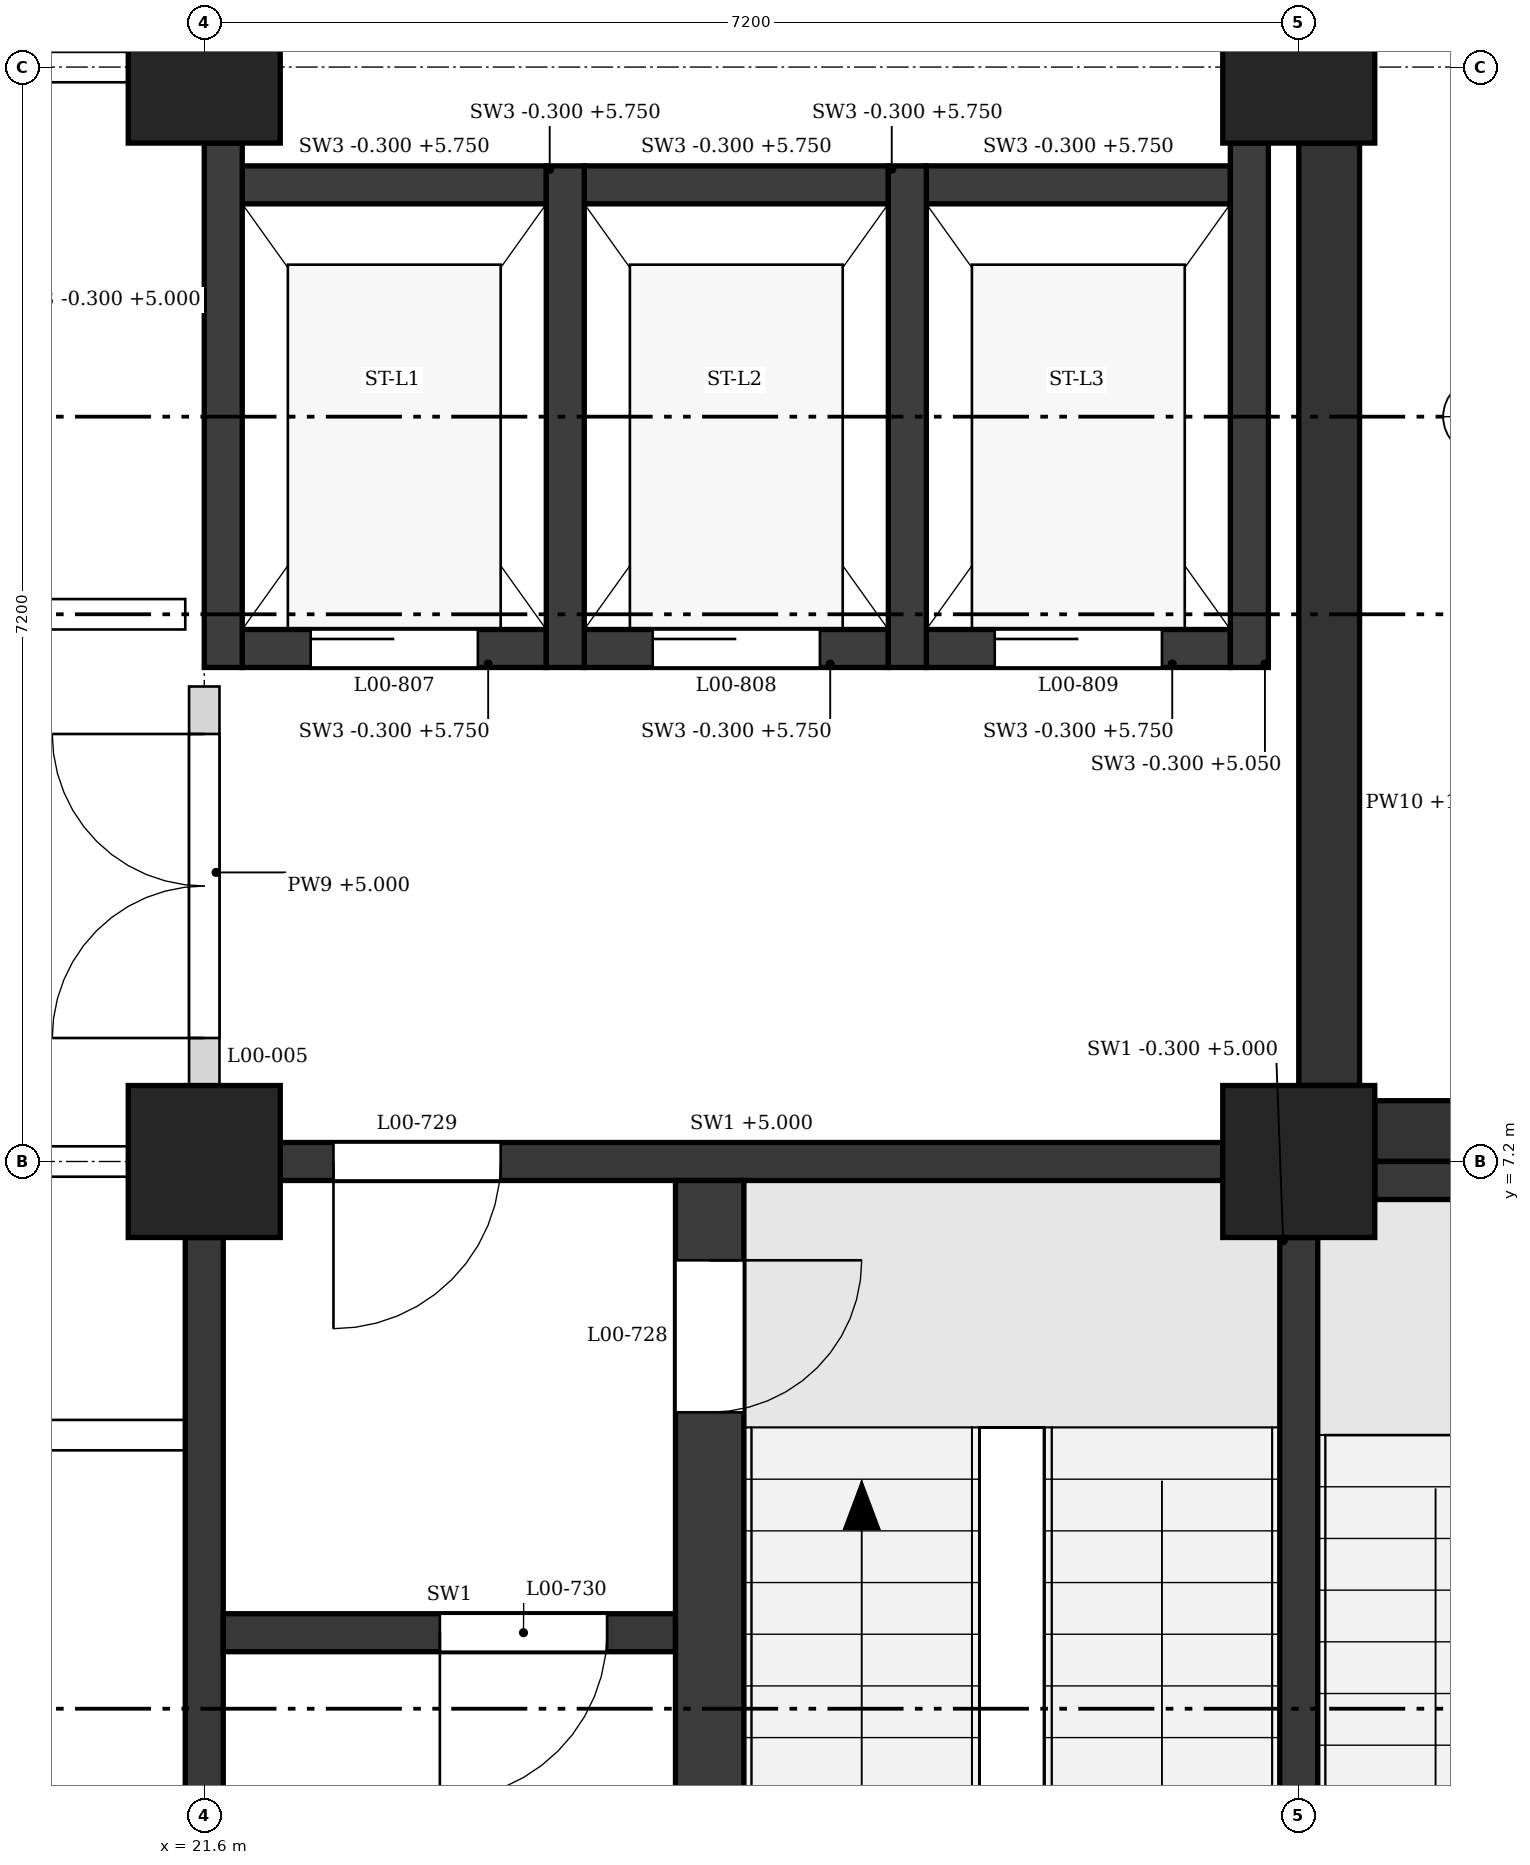
"""IFC4 building model, lengths in metres.
Left out: names, types, materials, properties, quantities, classifications, styles, units other than length and angle.
Written with IfcOpenShell. Run it as: python <this file> out.ifc"""

import sys

from ifc_helpers import new_model, si_unit, direction, frame, frame_2d, origin, origin_2d, place, context, subcontext, project, spatial, polyline, rectangle, outline, extrude, element, fill, save


model = new_model("IFC4")
c1 = context("Model", 3, precision=1e-05, world=origin(), true_north=direction((0.0, 1.0)))
c2 = subcontext(c1, "Body", "Model", "MODEL_VIEW")
j1 = project(units=[si_unit("LENGTHUNIT", "METRE"), si_unit("PLANEANGLEUNIT", "RADIAN")], contexts=[c1])
p1 = place(None, origin())
s1 = spatial("IfcSite", under=j1, at=p1, CompositionType="ELEMENT")
p2 = place(p1, origin())
s2 = spatial("IfcBuilding", under=s1, at=p2, CompositionType="ELEMENT")
p3 = place(p2, origin())
s3 = spatial("IfcBuildingStorey", under=s2, at=p3, CompositionType="ELEMENT", Elevation=0.0)
for number, where, z_axis, x_axis in (
    (1, (21.6, 7.2, 0.0), (0.0, 0.0, 1.0), (1.0, 0.0, 0.0)),
    (2, (21.6, 14.4, 0.0), (0.0, 0.0, 1.0), (1.0, 0.0, 0.0)),
    (3, (28.8, 7.2, 0.0), (0.0, 0.0, 1.0), (1.0, 0.0, 0.0)),
    (4, (28.8, 14.4, 0.0), (0.0, 0.0, 1.0), (1.0, 0.0, 0.0)),
):
    element("IfcColumn", number, at=place(p3, frame(where, z_axis=z_axis, x_axis=x_axis)), inside=s3, PredefinedType="COLUMN", context=c2, shape_type="SweptSolid", body=[
        extrude(rectangle(XDim=1.0, YDim=1.0, at=origin_2d()), origin(), (0.0, 0.0, 1.0), 6.0),
    ])
p4 = place(p3, frame((29.3, 7.075, 0.0), z_axis=(0.0, 0.0, 1.0), x_axis=(1.0, 0.0, 0.0)))
e5 = element("IfcWall", 5, at=p4, inside=s3, PredefinedType="SHEAR", context=c2, shape_type="SweptSolid", body=[
    extrude(rectangle(XDim=6.275, YDim=0.25, at=frame_2d((3.137, 0.0))), origin(), (0.0, 0.0, 1.0), 5.05),
])
p5 = place(p3, frame((28.8, 0.5, -0.3), z_axis=(0.0, 0.0, 1.0), x_axis=(0.0, 1.0, 0.0)))
e6 = element("IfcWall", 6, at=p5, inside=s3, PredefinedType="SHEAR", context=c2, shape_type="SweptSolid", body=[
    extrude(rectangle(XDim=6.2, YDim=0.25, at=frame_2d((3.1, 0.0))), origin(), (0.0, 0.0, 1.0), 5.3),
])
p6 = place(p3, frame((22.1, 7.2, 0.0), z_axis=(0.0, 0.0, 1.0), x_axis=(1.0, 0.0, 0.0)))
e7 = element("IfcWall", 7, at=p6, inside=s3, PredefinedType="SHEAR", context=c2, shape_type="SweptSolid", body=[
    extrude(rectangle(XDim=6.2, YDim=0.25, at=frame_2d((3.1, 0.0))), origin(), (0.0, 0.0, 1.0), 5.0),
])
p7 = place(p6, frame((0.35, 0.0, 0.0)))
e8 = element("IfcOpeningElement", 8, at=p7, cuts=e7, PredefinedType="OPENING", context=c2, shape_type="SweptSolid", body=[
    extrude(rectangle(XDim=1.1, YDim=2.1, at=frame_2d((0.55, 1.05))), frame((0.0, 0.135, 0.0), z_axis=(0.0, -1.0, 0.0), x_axis=(1.0, 0.0, 0.0)), (0.0, 0.0, 1.0), 0.27),
])
p8 = place(p3, frame((21.6, 0.5, 0.0), z_axis=(0.0, 0.0, 1.0), x_axis=(0.0, 1.0, 0.0)))
e9 = element("IfcWall", 9, at=p8, inside=s3, PredefinedType="SHEAR", context=c2, shape_type="SweptSolid", body=[
    extrude(rectangle(XDim=6.2, YDim=0.25, at=frame_2d((3.1, 0.0))), origin(), (0.0, 0.0, 1.0), 5.0),
])
p9 = place(p3, frame((24.925, 0.15, 0.0), z_axis=(0.0, 0.0, 1.0), x_axis=(0.0, 1.0, 0.0)))
e10 = element("IfcWall", 10, at=p9, inside=s3, PredefinedType="SHEAR", context=c2, shape_type="SweptSolid", body=[
    extrude(rectangle(XDim=6.925, YDim=0.45, at=frame_2d((3.462, 0.0))), origin(), (0.0, 0.0, 1.0), 5.75),
])
p10 = place(p9, frame((5.4, 0.0, 0.0)))
e11 = element("IfcOpeningElement", 11, at=p10, cuts=e10, PredefinedType="OPENING", context=c2, shape_type="SweptSolid", body=[
    extrude(rectangle(XDim=1.0, YDim=2.1, at=frame_2d((0.5, 1.05))), frame((0.0, 0.235, 0.0), z_axis=(0.0, -1.0, 0.0), x_axis=(1.0, 0.0, 0.0)), (0.0, 0.0, 1.0), 0.47),
])
p11 = place(p3, frame((21.725, 4.1, 0.0), z_axis=(0.0, 0.0, 1.0), x_axis=(1.0, 0.0, 0.0)))
e12 = element("IfcWall", 12, at=p11, inside=s3, PredefinedType="SHEAR", context=c2, shape_type="SweptSolid", body=[
    extrude(rectangle(XDim=2.975, YDim=0.25, at=frame_2d((1.487, 0.0))), origin(), (0.0, 0.0, 1.0), 5.75),
])
p12 = place(p11, frame((1.425, 0.0, 0.0)))
e13 = element("IfcOpeningElement", 13, at=p12, cuts=e12, PredefinedType="OPENING", context=c2, shape_type="SweptSolid", body=[
    extrude(rectangle(XDim=1.1, YDim=2.1, at=frame_2d((0.55, 1.05))), frame((0.0, 0.135, 0.0), z_axis=(0.0, -1.0, 0.0), x_axis=(1.0, 0.0, 0.0)), (0.0, 0.0, 1.0), 0.27),
])
p13 = place(p3, frame((21.725, 10.45, -0.3), z_axis=(0.0, 0.0, 1.0), x_axis=(0.0, 1.0, 0.0)))
e14 = element("IfcWall", 14, at=p13, inside=s3, PredefinedType="SHEAR", context=c2, shape_type="SweptSolid", body=[
    extrude(rectangle(XDim=3.45, YDim=0.25, at=frame_2d((1.725, 0.0))), origin(), (0.0, 0.0, 1.0), 5.3),
])
for number, where, z_axis, x_axis in (
    (15, (23.975, 10.45, -0.3), (0.0, 0.0, 1.0), (0.0, 1.0, 0.0)),
    (16, (26.225, 10.45, -0.3), (0.0, 0.0, 1.0), (0.0, 1.0, 0.0)),
):
    element("IfcWall", number, at=place(p3, frame(where, z_axis=z_axis, x_axis=x_axis)), inside=s3, PredefinedType="SHEAR", context=c2, shape_type="SweptSolid", body=[
        extrude(rectangle(XDim=3.3, YDim=0.25, at=frame_2d((1.65, 0.0))), origin(), (0.0, 0.0, 1.0), 6.05),
    ])
p14 = place(p3, frame((28.475, 10.45, -0.3), z_axis=(0.0, 0.0, 1.0), x_axis=(0.0, 1.0, 0.0)))
e17 = element("IfcWall", 17, at=p14, inside=s3, PredefinedType="SHEAR", context=c2, shape_type="SweptSolid", body=[
    extrude(rectangle(XDim=3.45, YDim=0.25, at=frame_2d((1.725, 0.0))), origin(), (0.0, 0.0, 1.0), 5.35),
])
p15 = place(p3, frame((21.85, 10.575, -0.3), z_axis=(0.0, 0.0, 1.0), x_axis=(1.0, 0.0, 0.0)))
e18 = element("IfcWall", 18, at=p15, inside=s3, PredefinedType="SHEAR", context=c2, shape_type="SweptSolid", body=[
    extrude(rectangle(XDim=2.0, YDim=0.25, at=frame_2d((1.0, 0.0))), origin(), (0.0, 0.0, 1.0), 6.05),
])
p16 = place(p15, frame((0.45, 0.0, 0.3)))
e19 = element("IfcOpeningElement", 19, at=p16, cuts=e18, PredefinedType="OPENING", context=c2, shape_type="SweptSolid", body=[
    extrude(rectangle(XDim=1.1, YDim=2.1, at=frame_2d((0.55, 1.05))), frame((0.0, 0.135, 0.0), z_axis=(0.0, -1.0, 0.0), x_axis=(1.0, 0.0, 0.0)), (0.0, 0.0, 1.0), 0.27),
])
p17 = place(p3, frame((21.85, 13.625, -0.3), z_axis=(0.0, 0.0, 1.0), x_axis=(1.0, 0.0, 0.0)))
e20 = element("IfcWall", 20, at=p17, inside=s3, PredefinedType="SHEAR", context=c2, shape_type="SweptSolid", body=[
    extrude(rectangle(XDim=2.0, YDim=0.25, at=frame_2d((1.0, 0.0))), origin(), (0.0, 0.0, 1.0), 6.05),
])
p18 = place(p3, frame((24.1, 10.575, -0.3), z_axis=(0.0, 0.0, 1.0), x_axis=(1.0, 0.0, 0.0)))
e21 = element("IfcWall", 21, at=p18, inside=s3, PredefinedType="SHEAR", context=c2, shape_type="SweptSolid", body=[
    extrude(rectangle(XDim=2.0, YDim=0.25, at=frame_2d((1.0, 0.0))), origin(), (0.0, 0.0, 1.0), 6.05),
])
p19 = place(p18, frame((0.45, 0.0, 0.3)))
e22 = element("IfcOpeningElement", 22, at=p19, cuts=e21, PredefinedType="OPENING", context=c2, shape_type="SweptSolid", body=[
    extrude(rectangle(XDim=1.1, YDim=2.1, at=frame_2d((0.55, 1.05))), frame((0.0, 0.135, 0.0), z_axis=(0.0, -1.0, 0.0), x_axis=(1.0, 0.0, 0.0)), (0.0, 0.0, 1.0), 0.27),
])
p20 = place(p3, frame((24.1, 13.625, -0.3), z_axis=(0.0, 0.0, 1.0), x_axis=(1.0, 0.0, 0.0)))
e23 = element("IfcWall", 23, at=p20, inside=s3, PredefinedType="SHEAR", context=c2, shape_type="SweptSolid", body=[
    extrude(rectangle(XDim=2.0, YDim=0.25, at=frame_2d((1.0, 0.0))), origin(), (0.0, 0.0, 1.0), 6.05),
])
p21 = place(p3, frame((26.35, 10.575, -0.3), z_axis=(0.0, 0.0, 1.0), x_axis=(1.0, 0.0, 0.0)))
e24 = element("IfcWall", 24, at=p21, inside=s3, PredefinedType="SHEAR", context=c2, shape_type="SweptSolid", body=[
    extrude(rectangle(XDim=2.0, YDim=0.25, at=frame_2d((1.0, 0.0))), origin(), (0.0, 0.0, 1.0), 6.05),
])
p22 = place(p21, frame((0.45, 0.0, 0.3)))
e25 = element("IfcOpeningElement", 25, at=p22, cuts=e24, PredefinedType="OPENING", context=c2, shape_type="SweptSolid", body=[
    extrude(rectangle(XDim=1.1, YDim=2.1, at=frame_2d((0.55, 1.05))), frame((0.0, 0.135, 0.0), z_axis=(0.0, -1.0, 0.0), x_axis=(1.0, 0.0, 0.0)), (0.0, 0.0, 1.0), 0.27),
])
p23 = place(p3, frame((26.35, 13.625, -0.3), z_axis=(0.0, 0.0, 1.0), x_axis=(1.0, 0.0, 0.0)))
e26 = element("IfcWall", 26, at=p23, inside=s3, PredefinedType="SHEAR", context=c2, shape_type="SweptSolid", body=[
    extrude(rectangle(XDim=2.0, YDim=0.25, at=frame_2d((1.0, 0.0))), origin(), (0.0, 0.0, 1.0), 6.05),
])
p24 = place(p3, frame((14.5, 5.4, 0.0), z_axis=(0.0, 0.0, 1.0), x_axis=(1.0, 0.0, 0.0)))
e27 = element("IfcWall", 27, at=p24, inside=s3, PredefinedType="PARTITIONING", context=c2, shape_type="SweptSolid", body=[
    extrude(outline(polyline([(0.0, 0.0), (6.975, 0.0), (6.975, 5.0), (6.85, 5.0), (6.85, 5.75), (0.15, 5.75), (0.15, 5.0), (0.0, 5.0), (0.0, 0.0)])), frame((0.0, 0.1, 0.0), z_axis=(0.0, -1.0, 0.0), x_axis=(1.0, 0.0, 0.0)), (0.0, 0.0, 1.0), 0.2),
])
p25 = place(p24, frame((1.25, 0.0, 0.0)))
e28 = element("IfcOpeningElement", 28, at=p25, cuts=e27, PredefinedType="OPENING", context=c2, shape_type="SweptSolid", body=[
    extrude(rectangle(XDim=1.0, YDim=2.1, at=frame_2d((0.5, 1.05))), frame((0.0, 0.11, 0.0), z_axis=(0.0, -1.0, 0.0), x_axis=(1.0, 0.0, 0.0)), (0.0, 0.0, 1.0), 0.22),
])
p26 = place(p24, frame((4.738, 0.0, 0.0)))
e29 = element("IfcOpeningElement", 29, at=p26, cuts=e27, PredefinedType="OPENING", context=c2, shape_type="SweptSolid", body=[
    extrude(rectangle(XDim=1.0, YDim=2.1, at=frame_2d((0.5, 1.05))), frame((0.0, 0.11, 0.0), z_axis=(0.0, -1.0, 0.0), x_axis=(1.0, 0.0, 0.0)), (0.0, 0.0, 1.0), 0.22),
])
p27 = place(p3, frame((14.9, 7.2, 0.0), z_axis=(0.0, 0.0, 1.0), x_axis=(1.0, 0.0, 0.0)))
e30 = element("IfcWall", 30, at=p27, inside=s3, PredefinedType="PARTITIONING", context=c2, shape_type="SweptSolid", body=[
    extrude(rectangle(XDim=6.2, YDim=0.2, at=frame_2d((3.1, 0.0))), origin(), (0.0, 0.0, 1.0), 5.0),
])
p28 = place(p27, frame((2.6, 0.0, 0.0)))
e31 = element("IfcOpeningElement", 31, at=p28, cuts=e30, PredefinedType="OPENING", context=c2, shape_type="SweptSolid", body=[
    extrude(rectangle(XDim=1.0, YDim=2.1, at=frame_2d((0.5, 1.05))), frame((0.0, 0.11, 0.0), z_axis=(0.0, -1.0, 0.0), x_axis=(1.0, 0.0, 0.0)), (0.0, 0.0, 1.0), 0.22),
])
p29 = place(p3, frame((29.3, 7.4, 0.0), z_axis=(0.0, 0.0, 1.0), x_axis=(1.0, 0.0, 0.0)))
e32 = element("IfcWall", 32, at=p29, inside=s3, PredefinedType="SOLIDWALL", context=c2, shape_type="SweptSolid", body=[
    extrude(rectangle(XDim=6.275, YDim=0.4, at=frame_2d((3.137, 0.0))), origin(), (0.0, 0.0, 1.0), 10.7),
])
p30 = place(p3, frame((17.9, 10.8, 0.0), z_axis=(0.0, 0.0, 1.0), x_axis=(1.0, 0.0, 0.0)))
e33 = element("IfcWall", 33, at=p30, inside=s3, PredefinedType="PARTITIONING", context=c2, shape_type="SweptSolid", body=[
    extrude(outline(polyline([(0.0, 0.0), (3.575, 0.0), (3.575, 5.0), (3.45, 5.0), (3.45, 5.75), (0.0, 5.75), (0.0, 0.0)])), frame((0.0, 0.1, 0.0), z_axis=(0.0, -1.0, 0.0), x_axis=(1.0, 0.0, 0.0)), (0.0, 0.0, 1.0), 0.2),
])
p31 = place(p30, frame((1.338, 0.0, 0.0)))
e34 = element("IfcOpeningElement", 34, at=p31, cuts=e33, PredefinedType="OPENING", context=c2, shape_type="SweptSolid", body=[
    extrude(rectangle(XDim=1.0, YDim=2.1, at=frame_2d((0.5, 1.05))), frame((0.0, 0.11, 0.0), z_axis=(0.0, -1.0, 0.0), x_axis=(1.0, 0.0, 0.0)), (0.0, 0.0, 1.0), 0.22),
])
p32 = place(p3, frame((18.1, 14.4, 0.0), z_axis=(0.0, 0.0, 1.0), x_axis=(1.0, 0.0, 0.0)))
e35 = element("IfcWall", 35, at=p32, inside=s3, PredefinedType="PARTITIONING", context=c2, shape_type="SweptSolid", body=[
    extrude(rectangle(XDim=3.0, YDim=0.2, at=frame_2d((1.5, 0.0))), origin(), (0.0, 0.0, 1.0), 5.0),
])
p33 = place(p3, frame((21.6, 7.7, 0.0), z_axis=(0.0, 0.0, 1.0), x_axis=(0.0, 1.0, 0.0)))
e36 = element("IfcWall", 36, at=p33, inside=s3, PredefinedType="PARTITIONING", context=c2, shape_type="SweptSolid", body=[
    extrude(rectangle(XDim=2.625, YDim=0.2, at=frame_2d((1.312, 0.0))), origin(), (0.0, 0.0, 1.0), 5.0),
])
p34 = place(p33, frame((0.312, 0.0, 0.0)))
e37 = element("IfcOpeningElement", 37, at=p34, cuts=e36, PredefinedType="OPENING", context=c2, shape_type="SweptSolid", body=[
    extrude(rectangle(XDim=2.0, YDim=2.4, at=frame_2d((1.0, 1.2))), frame((0.0, 0.11, 0.0), z_axis=(0.0, -1.0, 0.0), x_axis=(1.0, 0.0, 0.0)), (0.0, 0.0, 1.0), 0.22),
])
p35 = place(p3, frame((29.0, 7.7, 0.0), z_axis=(0.0, 0.0, 1.0), x_axis=(0.0, 1.0, 0.0)))
e38 = element("IfcWall", 38, at=p35, inside=s3, PredefinedType="SOLIDWALL", context=c2, shape_type="SweptSolid", body=[
    extrude(rectangle(XDim=6.2, YDim=0.4, at=frame_2d((3.1, 0.0))), origin(), (0.0, 0.0, 1.0), 10.55),
])
p36 = place(p10, frame((1.0, 0.0, 0.0), z_axis=(0.0, 0.0, 1.0), x_axis=(-1.0, 0.0, 0.0)))
e39 = element("IfcDoor", 39, at=p36, inside=s3, OperationType="SINGLE_SWING_LEFT", PredefinedType="DOOR", context=c2, shape_type="SweptSolid", body=[
    extrude(rectangle(XDim=1.0, YDim=2.1, at=frame_2d((0.5, 1.05))), frame((0.0, 0.025, 0.0), z_axis=(0.0, -1.0, 0.0), x_axis=(1.0, 0.0, 0.0)), (0.0, 0.0, 1.0), 0.05),
])
fill(e11, e39)
p37 = place(p7, frame((1.1, 0.0, 0.0), z_axis=(0.0, 0.0, 1.0), x_axis=(-1.0, 0.0, 0.0)))
e40 = element("IfcDoor", 40, at=p37, inside=s3, OperationType="SINGLE_SWING_RIGHT", PredefinedType="DOOR", context=c2, shape_type="SweptSolid", body=[
    extrude(rectangle(XDim=1.1, YDim=2.1, at=frame_2d((0.55, 1.05))), frame((0.0, 0.025, 0.0), z_axis=(0.0, -1.0, 0.0), x_axis=(1.0, 0.0, 0.0)), (0.0, 0.0, 1.0), 0.05),
])
fill(e8, e40)
p38 = place(p12, frame((1.1, 0.0, 0.0), z_axis=(0.0, 0.0, 1.0), x_axis=(-1.0, 0.0, 0.0)))
e41 = element("IfcDoor", 41, at=p38, inside=s3, OperationType="SINGLE_SWING_RIGHT", PredefinedType="DOOR", context=c2, shape_type="SweptSolid", body=[
    extrude(rectangle(XDim=1.1, YDim=2.1, at=frame_2d((0.55, 1.05))), frame((0.0, 0.025, 0.0), z_axis=(0.0, -1.0, 0.0), x_axis=(1.0, 0.0, 0.0)), (0.0, 0.0, 1.0), 0.05),
])
fill(e13, e41)
p39 = place(p16, origin())
e42 = element("IfcDoor", 42, at=p39, inside=s3, OperationType="SLIDING_TO_LEFT", PredefinedType="DOOR", context=c2, shape_type="SweptSolid", body=[
    extrude(rectangle(XDim=1.1, YDim=2.1, at=frame_2d((0.55, 1.05))), frame((0.0, 0.025, 0.0), z_axis=(0.0, -1.0, 0.0), x_axis=(1.0, 0.0, 0.0)), (0.0, 0.0, 1.0), 0.05),
])
fill(e19, e42)
p40 = place(p19, origin())
e43 = element("IfcDoor", 43, at=p40, inside=s3, OperationType="SLIDING_TO_LEFT", PredefinedType="DOOR", context=c2, shape_type="SweptSolid", body=[
    extrude(rectangle(XDim=1.1, YDim=2.1, at=frame_2d((0.55, 1.05))), frame((0.0, 0.025, 0.0), z_axis=(0.0, -1.0, 0.0), x_axis=(1.0, 0.0, 0.0)), (0.0, 0.0, 1.0), 0.05),
])
fill(e22, e43)
p41 = place(p22, origin())
e44 = element("IfcDoor", 44, at=p41, inside=s3, OperationType="SLIDING_TO_LEFT", PredefinedType="DOOR", context=c2, shape_type="SweptSolid", body=[
    extrude(rectangle(XDim=1.1, YDim=2.1, at=frame_2d((0.55, 1.05))), frame((0.0, 0.025, 0.0), z_axis=(0.0, -1.0, 0.0), x_axis=(1.0, 0.0, 0.0)), (0.0, 0.0, 1.0), 0.05),
])
fill(e25, e44)
p42 = place(p34, origin())
e45 = element("IfcDoor", 45, at=p42, inside=s3, OperationType="DOUBLE_DOOR_SINGLE_SWING", PredefinedType="DOOR", context=c2, shape_type="SweptSolid", body=[
    extrude(rectangle(XDim=2.0, YDim=2.4, at=frame_2d((1.0, 1.2))), frame((0.0, 0.025, 0.0), z_axis=(0.0, -1.0, 0.0), x_axis=(1.0, 0.0, 0.0)), (0.0, 0.0, 1.0), 0.05),
])
fill(e37, e45)
save(model, sys.argv[1])
